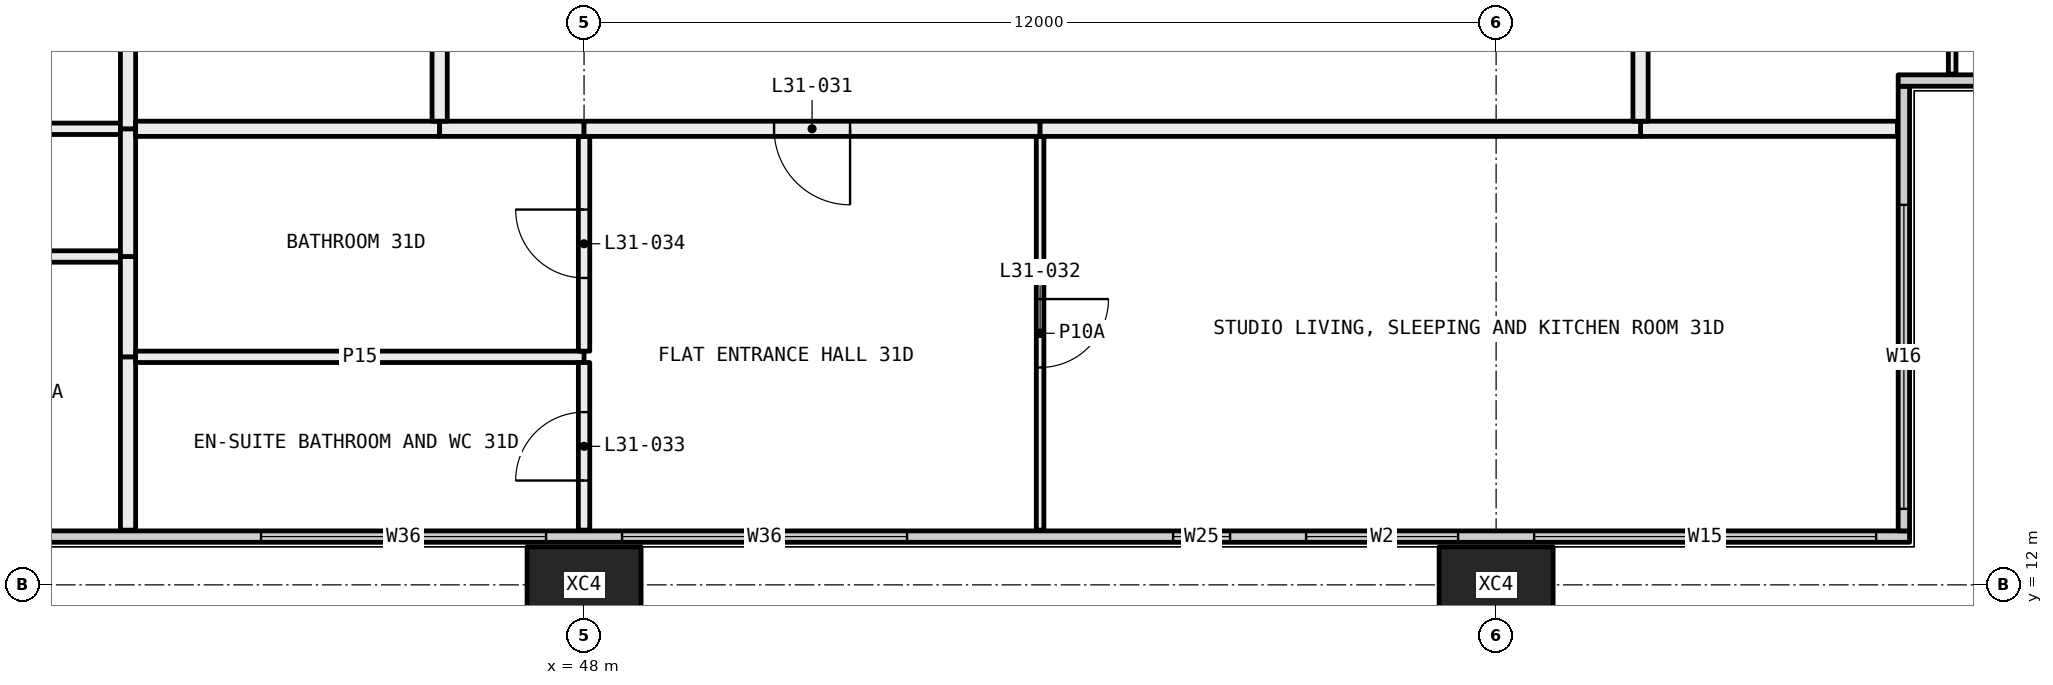
"""IFC4 building model, lengths in metres.
Left out: names, types, materials, properties, quantities, classifications, styles, units other than length and angle.
Written with IfcOpenShell. Run it as: python <this file> out.ifc"""

import sys

from ifc_helpers import new_model, si_unit, direction, frame, frame_2d, origin, origin_2d, place, context, subcontext, project, spatial, rectangle, hollow_rectangle, extrude, element, fill, save


model = new_model("IFC4")
c1 = context("Model", 3, precision=1e-05, world=origin(), true_north=direction((0.0, 1.0)))
c2 = subcontext(c1, "Body", "Model", "MODEL_VIEW")
j1 = project(units=[si_unit("LENGTHUNIT", "METRE"), si_unit("PLANEANGLEUNIT", "RADIAN")], contexts=[c1])
p1 = place(None, origin())
s1 = spatial("IfcSite", under=j1, at=p1, CompositionType="ELEMENT")
p2 = place(p1, origin())
s2 = spatial("IfcBuilding", under=s1, at=p2, CompositionType="ELEMENT")
p3 = place(p2, frame((0.0, 0.0, 120.75)))
s3 = spatial("IfcBuildingStorey", under=s2, at=p3, CompositionType="ELEMENT", Elevation=120.75)
for number, where, z_axis, x_axis in (
    (1, (48.0, 12.0, -0.4), (0.0, 0.0, 1.0), (1.0, 0.0, 0.0)),
    (2, (60.0, 12.0, -0.4), (0.0, 0.0, 1.0), (1.0, 0.0, 0.0)),
):
    element("IfcColumn", number, at=place(p3, frame(where, z_axis=z_axis, x_axis=x_axis)), inside=s3, PredefinedType="COLUMN", context=c2, shape_type="SweptSolid", body=[
        extrude(hollow_rectangle(XDim=1.5, YDim=1.0, WallThickness=0.06, at=origin_2d()), origin(), (0.0, 0.0, 1.0), 3.45),
    ])
p4 = place(p3, frame((6.56, 12.635, 0.0), z_axis=(0.0, 0.0, 1.0), x_axis=(1.0, 0.0, 0.0)))
e3 = element("IfcWall", 3, at=p4, inside=s3, PredefinedType="ELEMENTEDWALL", context=c2, shape_type="SweptSolid", body=[
    extrude(rectangle(XDim=58.88, YDim=0.15, at=frame_2d((29.44, 0.0))), origin(), (0.0, 0.0, 1.0), 3.05),
])
p5 = place(p4, frame((0.44, 0.0, 0.45)))
e4 = element("IfcOpeningElement", 4, at=p5, cuts=e3, PredefinedType="OPENING", context=c2, shape_type="SweptSolid", body=[
    extrude(rectangle(XDim=4.5, YDim=2.55, at=frame_2d((2.25, 1.275))), frame((0.0, 0.085, 0.0), z_axis=(0.0, -1.0, 0.0), x_axis=(1.0, 0.0, 0.0)), (0.0, 0.0, 1.0), 0.17),
])
p6 = place(p4, frame((5.94, 0.0, 0.45)))
e5 = element("IfcOpeningElement", 5, at=p6, cuts=e3, PredefinedType="OPENING", context=c2, shape_type="SweptSolid", body=[
    extrude(rectangle(XDim=3.75, YDim=2.55, at=frame_2d((1.875, 1.275))), frame((0.0, 0.085, 0.0), z_axis=(0.0, -1.0, 0.0), x_axis=(1.0, 0.0, 0.0)), (0.0, 0.0, 1.0), 0.17),
])
p7 = place(p4, frame((13.19, 0.0, 0.45)))
e6 = element("IfcOpeningElement", 6, at=p7, cuts=e3, PredefinedType="OPENING", context=c2, shape_type="SweptSolid", body=[
    extrude(rectangle(XDim=3.75, YDim=2.55, at=frame_2d((1.875, 1.275))), frame((0.0, 0.085, 0.0), z_axis=(0.0, -1.0, 0.0), x_axis=(1.0, 0.0, 0.0)), (0.0, 0.0, 1.0), 0.17),
])
p8 = place(p4, frame((17.94, 0.0, 0.45)))
e7 = element("IfcOpeningElement", 7, at=p8, cuts=e3, PredefinedType="OPENING", context=c2, shape_type="SweptSolid", body=[
    extrude(rectangle(XDim=3.75, YDim=2.55, at=frame_2d((1.875, 1.275))), frame((0.0, 0.085, 0.0), z_axis=(0.0, -1.0, 0.0), x_axis=(1.0, 0.0, 0.0)), (0.0, 0.0, 1.0), 0.17),
])
p9 = place(p4, frame((25.19, 0.0, 0.45)))
e8 = element("IfcOpeningElement", 8, at=p9, cuts=e3, PredefinedType="OPENING", context=c2, shape_type="SweptSolid", body=[
    extrude(rectangle(XDim=0.75, YDim=2.55, at=frame_2d((0.375, 1.275))), frame((0.0, 0.085, 0.0), z_axis=(0.0, -1.0, 0.0), x_axis=(1.0, 0.0, 0.0)), (0.0, 0.0, 1.0), 0.17),
])
p10 = place(p4, frame((26.94, 0.0, 0.45)))
e9 = element("IfcOpeningElement", 9, at=p10, cuts=e3, PredefinedType="OPENING", context=c2, shape_type="SweptSolid", body=[
    extrude(rectangle(XDim=2.0, YDim=2.55, at=frame_2d((1.0, 1.275))), frame((0.0, 0.085, 0.0), z_axis=(0.0, -1.0, 0.0), x_axis=(1.0, 0.0, 0.0)), (0.0, 0.0, 1.0), 0.17),
])
p11 = place(p4, frame((29.94, 0.0, 0.45)))
e10 = element("IfcOpeningElement", 10, at=p11, cuts=e3, PredefinedType="OPENING", context=c2, shape_type="SweptSolid", body=[
    extrude(rectangle(XDim=3.75, YDim=2.55, at=frame_2d((1.875, 1.275))), frame((0.0, 0.085, 0.0), z_axis=(0.0, -1.0, 0.0), x_axis=(1.0, 0.0, 0.0)), (0.0, 0.0, 1.0), 0.17),
])
p12 = place(p4, frame((37.19, 0.0, 0.45)))
e11 = element("IfcOpeningElement", 11, at=p12, cuts=e3, PredefinedType="OPENING", context=c2, shape_type="SweptSolid", body=[
    extrude(rectangle(XDim=3.75, YDim=2.55, at=frame_2d((1.875, 1.275))), frame((0.0, 0.085, 0.0), z_axis=(0.0, -1.0, 0.0), x_axis=(1.0, 0.0, 0.0)), (0.0, 0.0, 1.0), 0.17),
])
p13 = place(p4, frame((41.94, 0.0, 0.45)))
e12 = element("IfcOpeningElement", 12, at=p13, cuts=e3, PredefinedType="OPENING", context=c2, shape_type="SweptSolid", body=[
    extrude(rectangle(XDim=3.75, YDim=2.55, at=frame_2d((1.875, 1.275))), frame((0.0, 0.085, 0.0), z_axis=(0.0, -1.0, 0.0), x_axis=(1.0, 0.0, 0.0)), (0.0, 0.0, 1.0), 0.17),
])
p14 = place(p4, frame((49.19, 0.0, 0.45)))
e13 = element("IfcOpeningElement", 13, at=p14, cuts=e3, PredefinedType="OPENING", context=c2, shape_type="SweptSolid", body=[
    extrude(rectangle(XDim=0.75, YDim=2.55, at=frame_2d((0.375, 1.275))), frame((0.0, 0.085, 0.0), z_axis=(0.0, -1.0, 0.0), x_axis=(1.0, 0.0, 0.0)), (0.0, 0.0, 1.0), 0.17),
])
p15 = place(p4, frame((50.94, 0.0, 0.45)))
e14 = element("IfcOpeningElement", 14, at=p15, cuts=e3, PredefinedType="OPENING", context=c2, shape_type="SweptSolid", body=[
    extrude(rectangle(XDim=2.0, YDim=2.55, at=frame_2d((1.0, 1.275))), frame((0.0, 0.085, 0.0), z_axis=(0.0, -1.0, 0.0), x_axis=(1.0, 0.0, 0.0)), (0.0, 0.0, 1.0), 0.17),
])
p16 = place(p4, frame((53.94, 0.0, 0.45)))
e15 = element("IfcOpeningElement", 15, at=p16, cuts=e3, PredefinedType="OPENING", context=c2, shape_type="SweptSolid", body=[
    extrude(rectangle(XDim=4.5, YDim=2.55, at=frame_2d((2.25, 1.275))), frame((0.0, 0.085, 0.0), z_axis=(0.0, -1.0, 0.0), x_axis=(1.0, 0.0, 0.0)), (0.0, 0.0, 1.0), 0.17),
])
p17 = place(p3, frame((65.365, 12.71, 0.0), z_axis=(0.0, 0.0, 1.0), x_axis=(0.0, 1.0, 0.0)))
e16 = element("IfcWall", 16, at=p17, inside=s3, PredefinedType="ELEMENTEDWALL", context=c2, shape_type="SweptSolid", body=[
    extrude(rectangle(XDim=5.85, YDim=0.15, at=frame_2d((2.925, 0.0))), origin(), (0.0, 0.0, 1.0), 3.05),
])
p18 = place(p17, frame((0.29, 0.0, 0.45)))
e17 = element("IfcOpeningElement", 17, at=p18, cuts=e16, PredefinedType="OPENING", context=c2, shape_type="SweptSolid", body=[
    extrude(rectangle(XDim=4.0, YDim=2.55, at=frame_2d((2.0, 1.275))), frame((0.0, 0.085, 0.0), z_axis=(0.0, -1.0, 0.0), x_axis=(1.0, 0.0, 0.0)), (0.0, 0.0, 1.0), 0.17),
])
p19 = place(p3, frame((65.29, 18.635, 0.0), z_axis=(0.0, 0.0, 1.0), x_axis=(1.0, 0.0, 0.0)))
e18 = element("IfcWall", 18, at=p19, inside=s3, PredefinedType="ELEMENTEDWALL", context=c2, shape_type="SweptSolid", body=[
    extrude(rectangle(XDim=6.15, YDim=0.15, at=frame_2d((3.075, 0.0))), origin(), (0.0, 0.0, 1.0), 3.05),
])
p20 = place(p19, frame((1.71, 0.0, 0.45)))
e19 = element("IfcOpeningElement", 19, at=p20, cuts=e18, PredefinedType="OPENING", context=c2, shape_type="SweptSolid", body=[
    extrude(rectangle(XDim=4.0, YDim=2.55, at=frame_2d((2.0, 1.275))), frame((0.0, 0.085, 0.0), z_axis=(0.0, -1.0, 0.0), x_axis=(1.0, 0.0, 0.0)), (0.0, 0.0, 1.0), 0.17),
])
p21 = place(p3, frame((41.9, 16.32, 0.0), z_axis=(0.0, 0.0, 1.0), x_axis=(-1.0, 0.0, 0.0)))
e20 = element("IfcWall", 20, at=p21, inside=s3, PredefinedType="PARTITIONING", context=c2, shape_type="SweptSolid", body=[
    extrude(rectangle(XDim=5.825, YDim=0.15, at=frame_2d((2.913, 0.0))), origin(), (0.0, 0.0, 1.0), 2.45),
])
p22 = place(p3, frame((42.0, 12.72, 0.0), z_axis=(0.0, 0.0, 1.0), x_axis=(0.0, 1.0, 0.0)))
e21 = element("IfcWall", 21, at=p22, inside=s3, PredefinedType="PARTITIONING", context=c2, shape_type="SweptSolid", body=[
    extrude(rectangle(XDim=2.28, YDim=0.2, at=frame_2d((1.14, 0.0))), origin(), (0.0, 0.0, 1.0), 3.05),
])
p23 = place(p3, frame((42.0, 15.0, 0.0), z_axis=(0.0, 0.0, 1.0), x_axis=(0.0, 1.0, 0.0)))
e22 = element("IfcWall", 22, at=p23, inside=s3, PredefinedType="PARTITIONING", context=c2, shape_type="SweptSolid", body=[
    extrude(rectangle(XDim=1.32, YDim=0.2, at=frame_2d((0.66, 0.0))), origin(), (0.0, 0.0, 1.0), 3.05),
])
p24 = place(p3, frame((41.9, 18.0, 0.0), z_axis=(0.0, 0.0, 1.0), x_axis=(-1.0, 0.0, 0.0)))
e23 = element("IfcWall", 23, at=p24, inside=s3, PredefinedType="PARTITIONING", context=c2, shape_type="SweptSolid", body=[
    extrude(rectangle(XDim=5.825, YDim=0.15, at=frame_2d((2.913, 0.0))), origin(), (0.0, 0.0, 1.0), 2.45),
])
p25 = place(p3, frame((42.0, 16.32, 0.0), z_axis=(0.0, 0.0, 1.0), x_axis=(0.0, 1.0, 0.0)))
e24 = element("IfcWall", 24, at=p25, inside=s3, PredefinedType="PARTITIONING", context=c2, shape_type="SweptSolid", body=[
    extrude(rectangle(XDim=1.68, YDim=0.2, at=frame_2d((0.84, 0.0))), origin(), (0.0, 0.0, 1.0), 3.05),
])
p26 = place(p3, frame((42.0, 18.0, 0.0), z_axis=(0.0, 0.0, 1.0), x_axis=(0.0, 1.0, 0.0)))
e25 = element("IfcWall", 25, at=p26, inside=s3, PredefinedType="PARTITIONING", context=c2, shape_type="SweptSolid", body=[
    extrude(rectangle(XDim=6.3, YDim=0.2, at=frame_2d((3.15, 0.0))), origin(), (0.0, 0.0, 1.0), 2.45),
])
p27 = place(p3, frame((48.0, 15.0, 0.0), z_axis=(0.0, 0.0, 1.0), x_axis=(-1.0, 0.0, 0.0)))
e26 = element("IfcWall", 26, at=p27, inside=s3, PredefinedType="PARTITIONING", context=c2, shape_type="SweptSolid", body=[
    extrude(rectangle(XDim=5.9, YDim=0.15, at=frame_2d((2.95, 0.0))), origin(), (0.0, 0.0, 1.0), 3.05),
])
p28 = place(p3, frame((48.0, 12.72, 0.0), z_axis=(0.0, 0.0, 1.0), x_axis=(0.0, 1.0, 0.0)))
e27 = element("IfcWall", 27, at=p28, inside=s3, PredefinedType="PARTITIONING", context=c2, shape_type="SweptSolid", body=[
    extrude(rectangle(XDim=2.205, YDim=0.15, at=frame_2d((1.103, 0.0))), origin(), (0.0, 0.0, 1.0), 3.05),
])
p29 = place(p28, frame((0.653, 0.0, 0.0)))
e28 = element("IfcOpeningElement", 28, at=p29, cuts=e27, PredefinedType="OPENING", context=c2, shape_type="SweptSolid", body=[
    extrude(rectangle(XDim=0.9, YDim=2.1, at=frame_2d((0.45, 1.05))), frame((0.0, 0.085, 0.0), z_axis=(0.0, -1.0, 0.0), x_axis=(1.0, 0.0, 0.0)), (0.0, 0.0, 1.0), 0.17),
])
p30 = place(p3, frame((48.0, 15.075, 0.0), z_axis=(0.0, 0.0, 1.0), x_axis=(0.0, 1.0, 0.0)))
e29 = element("IfcWall", 29, at=p30, inside=s3, PredefinedType="PARTITIONING", context=c2, shape_type="SweptSolid", body=[
    extrude(rectangle(XDim=2.825, YDim=0.15, at=frame_2d((1.413, 0.0))), origin(), (0.0, 0.0, 1.0), 3.05),
])
p31 = place(p30, frame((0.962, 0.0, 0.0)))
e30 = element("IfcOpeningElement", 30, at=p31, cuts=e29, PredefinedType="OPENING", context=c2, shape_type="SweptSolid", body=[
    extrude(rectangle(XDim=0.9, YDim=2.1, at=frame_2d((0.45, 1.05))), frame((0.0, 0.085, 0.0), z_axis=(0.0, -1.0, 0.0), x_axis=(1.0, 0.0, 0.0)), (0.0, 0.0, 1.0), 0.17),
])
p32 = place(p3, frame((46.1, 18.0, 0.0), z_axis=(0.0, 0.0, 1.0), x_axis=(-1.0, 0.0, 0.0)))
e31 = element("IfcWall", 31, at=p32, inside=s3, PredefinedType="PARTITIONING", context=c2, shape_type="SweptSolid", body=[
    extrude(rectangle(XDim=4.0, YDim=0.2, at=frame_2d((2.0, 0.0))), origin(), (0.0, 0.0, 1.0), 3.05),
])
p33 = place(p3, frame((48.0, 18.0, 0.0), z_axis=(0.0, 0.0, 1.0), x_axis=(-1.0, 0.0, 0.0)))
e32 = element("IfcWall", 32, at=p33, inside=s3, PredefinedType="PARTITIONING", context=c2, shape_type="SweptSolid", body=[
    extrude(rectangle(XDim=1.9, YDim=0.2, at=frame_2d((0.95, 0.0))), origin(), (0.0, 0.0, 1.0), 3.05),
])
p34 = place(p3, frame((54.0, 12.72, 0.0), z_axis=(0.0, 0.0, 1.0), x_axis=(0.0, 1.0, 0.0)))
e33 = element("IfcWall", 33, at=p34, inside=s3, PredefinedType="PARTITIONING", context=c2, shape_type="SweptSolid", body=[
    extrude(rectangle(XDim=5.18, YDim=0.1, at=frame_2d((2.59, 0.0))), origin(), (0.0, 0.0, 1.0), 3.05),
])
p35 = place(p34, frame((2.14, 0.0, 0.0)))
e34 = element("IfcOpeningElement", 34, at=p35, cuts=e33, PredefinedType="OPENING", context=c2, shape_type="SweptSolid", body=[
    extrude(rectangle(XDim=0.9, YDim=2.1, at=frame_2d((0.45, 1.05))), frame((0.0, 0.06, 0.0), z_axis=(0.0, -1.0, 0.0), x_axis=(1.0, 0.0, 0.0)), (0.0, 0.0, 1.0), 0.12),
])
p36 = place(p3, frame((54.0, 18.0, 0.0), z_axis=(0.0, 0.0, 1.0), x_axis=(-1.0, 0.0, 0.0)))
e35 = element("IfcWall", 35, at=p36, inside=s3, PredefinedType="PARTITIONING", context=c2, shape_type="SweptSolid", body=[
    extrude(rectangle(XDim=6.0, YDim=0.2, at=frame_2d((3.0, 0.0))), origin(), (0.0, 0.0, 1.0), 3.05),
])
p37 = place(p36, frame((2.5, 0.0, 0.0)))
e36 = element("IfcOpeningElement", 36, at=p37, cuts=e35, PredefinedType="OPENING", context=c2, shape_type="SweptSolid", body=[
    extrude(rectangle(XDim=1.0, YDim=2.1, at=frame_2d((0.5, 1.05))), frame((0.0, 0.11, 0.0), z_axis=(0.0, -1.0, 0.0), x_axis=(1.0, 0.0, 0.0)), (0.0, 0.0, 1.0), 0.22),
])
p38 = place(p3, frame((65.28, 18.0, 0.0), z_axis=(0.0, 0.0, 1.0), x_axis=(-1.0, 0.0, 0.0)))
e37 = element("IfcWall", 37, at=p38, inside=s3, PredefinedType="PARTITIONING", context=c2, shape_type="SweptSolid", body=[
    extrude(rectangle(XDim=3.38, YDim=0.2, at=frame_2d((1.69, 0.0))), origin(), (0.0, 0.0, 1.0), 3.05),
])
p39 = place(p3, frame((61.9, 18.0, 0.0), z_axis=(0.0, 0.0, 1.0), x_axis=(-1.0, 0.0, 0.0)))
e38 = element("IfcWall", 38, at=p39, inside=s3, PredefinedType="PARTITIONING", context=c2, shape_type="SweptSolid", body=[
    extrude(rectangle(XDim=7.9, YDim=0.2, at=frame_2d((3.95, 0.0))), origin(), (0.0, 0.0, 1.0), 3.05),
])
p40 = place(p3, frame((46.1, 18.1, 0.0), z_axis=(0.0, 0.0, 1.0), x_axis=(0.0, 1.0, 0.0)))
e39 = element("IfcWall", 39, at=p40, inside=s3, PredefinedType="PARTITIONING", context=c2, shape_type="SweptSolid", body=[
    extrude(rectangle(XDim=6.0, YDim=0.2, at=frame_2d((3.0, 0.0))), origin(), (0.0, 0.0, 1.0), 2.45),
])
p41 = place(p40, frame((2.55, 0.0, 0.0)))
e40 = element("IfcOpeningElement", 40, at=p41, cuts=e39, PredefinedType="OPENING", context=c2, shape_type="SweptSolid", body=[
    extrude(rectangle(XDim=0.9, YDim=2.1, at=frame_2d((0.45, 1.05))), frame((0.0, 0.11, 0.0), z_axis=(0.0, -1.0, 0.0), x_axis=(1.0, 0.0, 0.0)), (0.0, 0.0, 1.0), 0.22),
])
p42 = place(p3, frame((66.0, 22.5, 0.0), z_axis=(0.0, 0.0, 1.0), x_axis=(0.0, -1.0, 0.0)))
e41 = element("IfcWall", 41, at=p42, inside=s3, PredefinedType="PARTITIONING", context=c2, shape_type="SweptSolid", body=[
    extrude(rectangle(XDim=3.78, YDim=0.1, at=frame_2d((1.89, 0.0))), origin(), (0.0, 0.0, 1.0), 3.05),
])
p43 = place(p3, frame((61.9, 22.5, 0.0), z_axis=(0.0, 0.0, 1.0), x_axis=(0.0, -1.0, 0.0)))
e42 = element("IfcWall", 42, at=p43, inside=s3, PredefinedType="PARTITIONING", context=c2, shape_type="SweptSolid", body=[
    extrude(rectangle(XDim=4.4, YDim=0.2, at=frame_2d((2.2, 0.0))), origin(), (0.0, 0.0, 1.0), 3.05),
])
p44 = place(p12, origin())
e43 = element("IfcWindow", 43, at=p44, inside=s3, PartitioningType="SINGLE_PANEL", PredefinedType="WINDOW", context=c2, shape_type="SweptSolid", body=[
    extrude(rectangle(XDim=3.75, YDim=2.55, at=frame_2d((1.875, 1.275))), frame((0.0, 0.03, 0.0), z_axis=(0.0, -1.0, 0.0), x_axis=(1.0, 0.0, 0.0)), (0.0, 0.0, 1.0), 0.06),
])
fill(e11, e43)
p45 = place(p13, origin())
e44 = element("IfcWindow", 44, at=p45, inside=s3, PartitioningType="SINGLE_PANEL", PredefinedType="WINDOW", context=c2, shape_type="SweptSolid", body=[
    extrude(rectangle(XDim=3.75, YDim=2.55, at=frame_2d((1.875, 1.275))), frame((0.0, 0.03, 0.0), z_axis=(0.0, -1.0, 0.0), x_axis=(1.0, 0.0, 0.0)), (0.0, 0.0, 1.0), 0.06),
])
fill(e12, e44)
p46 = place(p14, origin())
e45 = element("IfcWindow", 45, at=p46, inside=s3, PartitioningType="SINGLE_PANEL", PredefinedType="WINDOW", context=c2, shape_type="SweptSolid", body=[
    extrude(rectangle(XDim=0.75, YDim=2.55, at=frame_2d((0.375, 1.275))), frame((0.0, 0.03, 0.0), z_axis=(0.0, -1.0, 0.0), x_axis=(1.0, 0.0, 0.0)), (0.0, 0.0, 1.0), 0.06),
])
fill(e13, e45)
p47 = place(p15, origin())
e46 = element("IfcWindow", 46, at=p47, inside=s3, PartitioningType="SINGLE_PANEL", PredefinedType="WINDOW", context=c2, shape_type="SweptSolid", body=[
    extrude(rectangle(XDim=2.0, YDim=2.55, at=frame_2d((1.0, 1.275))), frame((0.0, 0.03, 0.0), z_axis=(0.0, -1.0, 0.0), x_axis=(1.0, 0.0, 0.0)), (0.0, 0.0, 1.0), 0.06),
])
fill(e14, e46)
p48 = place(p16, origin())
e47 = element("IfcWindow", 47, at=p48, inside=s3, PartitioningType="SINGLE_PANEL", PredefinedType="WINDOW", context=c2, shape_type="SweptSolid", body=[
    extrude(rectangle(XDim=4.5, YDim=2.55, at=frame_2d((2.25, 1.275))), frame((0.0, 0.03, 0.0), z_axis=(0.0, -1.0, 0.0), x_axis=(1.0, 0.0, 0.0)), (0.0, 0.0, 1.0), 0.06),
])
fill(e15, e47)
p49 = place(p18, origin())
e48 = element("IfcWindow", 48, at=p49, inside=s3, PartitioningType="SINGLE_PANEL", PredefinedType="WINDOW", context=c2, shape_type="SweptSolid", body=[
    extrude(rectangle(XDim=4.0, YDim=2.55, at=frame_2d((2.0, 1.275))), frame((0.0, 0.03, 0.0), z_axis=(0.0, -1.0, 0.0), x_axis=(1.0, 0.0, 0.0)), (0.0, 0.0, 1.0), 0.06),
])
fill(e17, e48)
p50 = place(p37, origin())
e49 = element("IfcDoor", 49, at=p50, inside=s3, OperationType="SINGLE_SWING_RIGHT", PredefinedType="DOOR", context=c2, shape_type="SweptSolid", body=[
    extrude(rectangle(XDim=1.0, YDim=2.1, at=frame_2d((0.5, 1.05))), frame((0.0, 0.025, 0.0), z_axis=(0.0, -1.0, 0.0), x_axis=(1.0, 0.0, 0.0)), (0.0, 0.0, 1.0), 0.05),
])
fill(e36, e49)
p51 = place(p35, frame((0.9, 0.0, 0.0), x_axis=(-1.0, 0.0, 0.0)))
e50 = element("IfcDoor", 50, at=p51, inside=s3, OperationType="SINGLE_SWING_RIGHT", PredefinedType="DOOR", context=c2, shape_type="SweptSolid", body=[
    extrude(rectangle(XDim=0.9, YDim=2.1, at=frame_2d((0.45, 1.05))), frame((0.0, 0.025, 0.0), z_axis=(0.0, -1.0, 0.0), x_axis=(1.0, 0.0, 0.0)), (0.0, 0.0, 1.0), 0.05),
])
fill(e34, e50)
p52 = place(p29, origin())
e51 = element("IfcDoor", 51, at=p52, inside=s3, OperationType="SINGLE_SWING_RIGHT", PredefinedType="DOOR", context=c2, shape_type="SweptSolid", body=[
    extrude(rectangle(XDim=0.9, YDim=2.1, at=frame_2d((0.45, 1.05))), frame((0.0, 0.025, 0.0), z_axis=(0.0, -1.0, 0.0), x_axis=(1.0, 0.0, 0.0)), (0.0, 0.0, 1.0), 0.05),
])
fill(e28, e51)
p53 = place(p31, origin())
e52 = element("IfcDoor", 52, at=p53, inside=s3, OperationType="SINGLE_SWING_LEFT", PredefinedType="DOOR", context=c2, shape_type="SweptSolid", body=[
    extrude(rectangle(XDim=0.9, YDim=2.1, at=frame_2d((0.45, 1.05))), frame((0.0, 0.025, 0.0), z_axis=(0.0, -1.0, 0.0), x_axis=(1.0, 0.0, 0.0)), (0.0, 0.0, 1.0), 0.05),
])
fill(e30, e52)
save(model, sys.argv[1])
